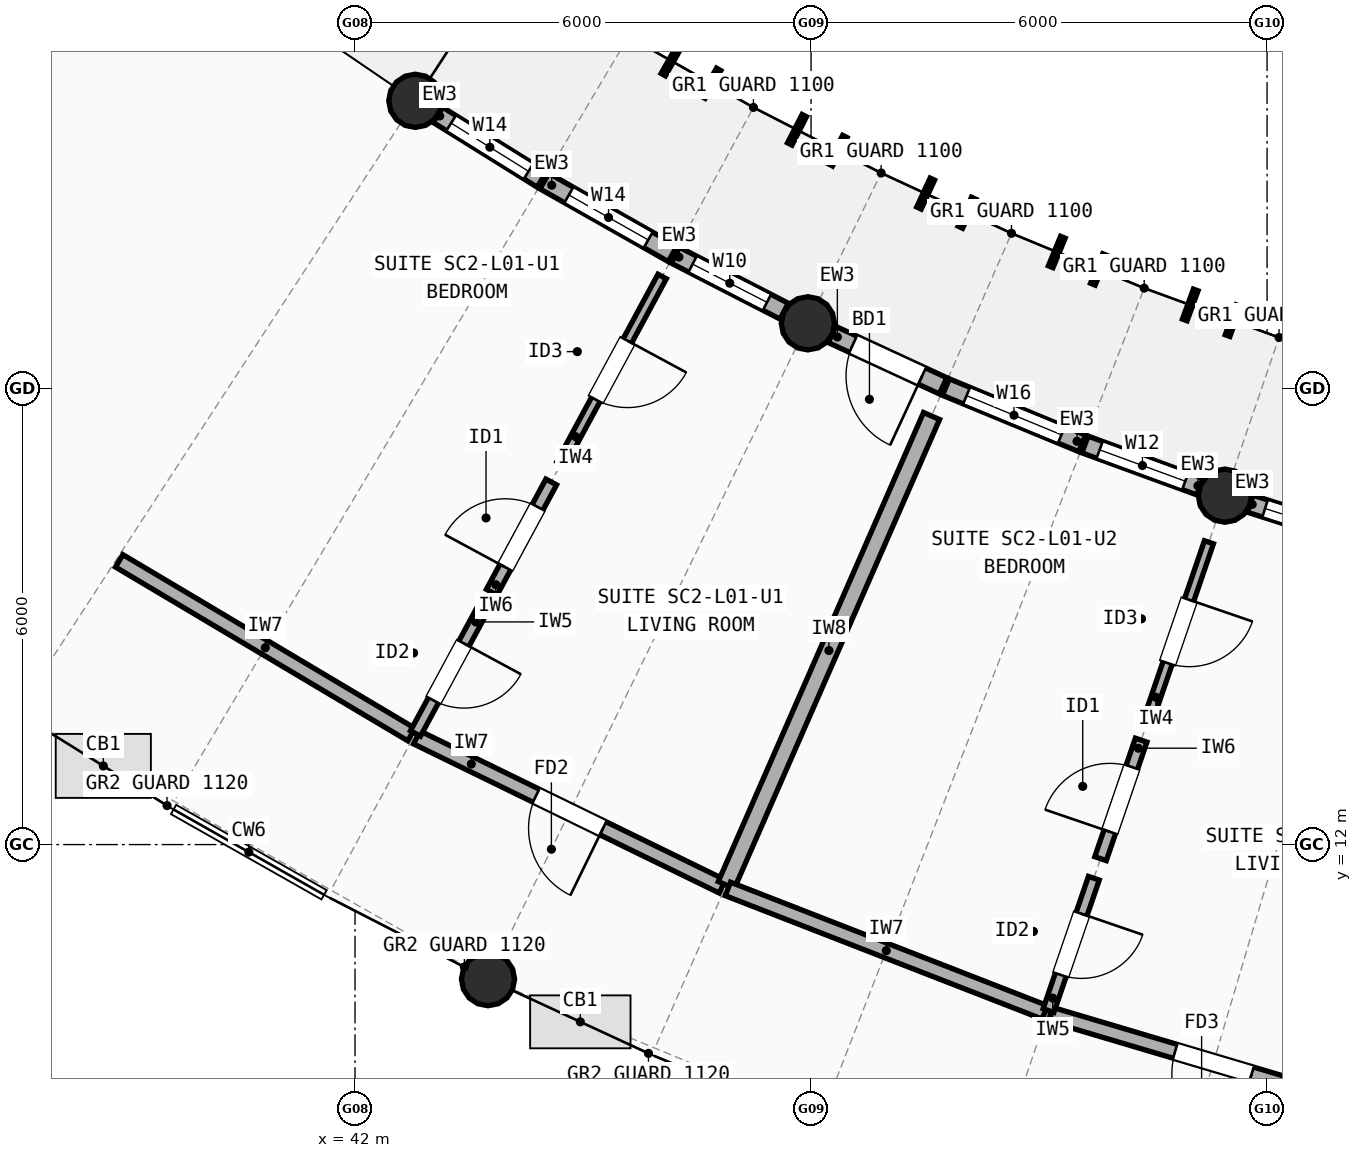
"""IFC4 building model, lengths in metres.
Left out: names, types, materials, properties, quantities, classifications, styles, units other than length and angle.
Written with IfcOpenShell. Run it as: python <this file> out.ifc"""

import sys

from ifc_helpers import new_model, si_unit, direction, frame, frame_2d, origin, origin_2d, place, context, subcontext, project, spatial, rectangle, circle, extrude, element, fill, save


model = new_model("IFC4")
c1 = context("Model", 3, precision=1e-05, world=origin(), true_north=direction((0.0, 1.0)))
c2 = subcontext(c1, "Body", "Model", "MODEL_VIEW")
j1 = project(units=[si_unit("LENGTHUNIT", "METRE"), si_unit("PLANEANGLEUNIT", "RADIAN")], contexts=[c1])
p1 = place(None, origin())
s1 = spatial("IfcSite", under=j1, at=p1, CompositionType="ELEMENT")
p2 = place(p1, origin())
s2 = spatial("IfcBuilding", under=s1, at=p2, CompositionType="ELEMENT")
p3 = place(p2, frame((0.0, 0.0, 4.5)))
s3 = spatial("IfcBuildingStorey", under=s2, at=p3, CompositionType="ELEMENT", Elevation=4.5)
for number, where, z_axis, x_axis in (
    (1, (42.793, 21.785, 0.0), (0.0, 0.0, 1.0), (1.0, 0.0, 0.0)),
    (2, (47.958, 18.858, 0.0), (0.0, 0.0, 1.0), (1.0, 0.0, 0.0)),
    (3, (43.75, 10.229, 0.0), (0.0, 0.0, 1.0), (1.0, 0.0, 0.0)),
    (4, (53.445, 16.59, 0.0), (0.0, 0.0, 1.0), (1.0, 0.0, 0.0)),
):
    element("IfcColumn", number, at=place(p3, frame(where, z_axis=z_axis, x_axis=x_axis)), inside=s3, PredefinedType="COLUMN", context=c2, shape_type="SweptSolid", body=[
        extrude(circle(Radius=0.35, at=origin_2d()), origin(), (0.0, 0.0, 1.0), 2.948),
    ])
p4 = place(p3, frame((43.091, 21.6, 0.0), z_axis=(0.0, 0.0, 1.0), x_axis=(0.848934138406, -0.528498655296, 0.0)))
e5 = element("IfcWall", 5, at=p4, inside=s3, PredefinedType="STANDARD", context=c2, shape_type="SweptSolid", body=[
    extrude(rectangle(XDim=1.61, YDim=0.235, at=frame_2d((0.805, 0.0))), origin(), (0.0, 0.0, 1.0), 2.684),
])
p5 = place(p4, frame((0.205, 0.0, 0.85)))
e6 = element("IfcOpeningElement", 6, at=p5, cuts=e5, PredefinedType="OPENING", context=c2, shape_type="SweptSolid", body=[
    extrude(rectangle(XDim=1.2, YDim=1.5, at=frame_2d((0.6, 0.75))), frame((0.0, 0.127, 0.0), z_axis=(0.0, -1.0, 0.0), x_axis=(1.0, 0.0, 0.0)), (0.0, 0.0, 1.0), 0.255),
])
p6 = place(p3, frame((44.492, 20.729, 0.0), z_axis=(0.0, 0.0, 1.0), x_axis=(0.86993400964, -0.493168144623, 0.0)))
e7 = element("IfcWall", 7, at=p6, inside=s3, PredefinedType="STANDARD", context=c2, shape_type="SweptSolid", body=[
    extrude(rectangle(XDim=1.94, YDim=0.235, at=frame_2d((0.97, 0.0))), origin(), (0.0, 0.0, 1.0), 2.684),
])
p7 = place(p6, frame((0.37, 0.0, 0.85)))
e8 = element("IfcOpeningElement", 8, at=p7, cuts=e7, PredefinedType="OPENING", context=c2, shape_type="SweptSolid", body=[
    extrude(rectangle(XDim=1.2, YDim=1.5, at=frame_2d((0.6, 0.75))), frame((0.0, 0.127, 0.0), z_axis=(0.0, -1.0, 0.0), x_axis=(1.0, 0.0, 0.0)), (0.0, 0.0, 1.0), 0.255),
])
p8 = place(p3, frame((46.215, 19.753, 0.0), z_axis=(0.0, 0.0, 1.0), x_axis=(0.889553696252, -0.456830626693, 0.0)))
e9 = element("IfcWall", 9, at=p8, inside=s3, PredefinedType="STANDARD", context=c2, shape_type="SweptSolid", body=[
    extrude(rectangle(XDim=1.61, YDim=0.235, at=frame_2d((0.805, 0.0))), origin(), (0.0, 0.0, 1.0), 2.684),
])
p9 = place(p8, frame((0.255, 0.0, 0.85)))
e10 = element("IfcOpeningElement", 10, at=p9, cuts=e9, PredefinedType="OPENING", context=c2, shape_type="SweptSolid", body=[
    extrude(rectangle(XDim=1.1, YDim=1.45, at=frame_2d((0.55, 0.725))), frame((0.0, 0.127, 0.0), z_axis=(0.0, -1.0, 0.0), x_axis=(1.0, 0.0, 0.0)), (0.0, 0.0, 1.0), 0.255),
])
p10 = place(p3, frame((48.276, 18.711, 0.0), z_axis=(0.0, 0.0, 1.0), x_axis=(0.907630651946, -0.419769698344, 0.0)))
e11 = element("IfcWall", 11, at=p10, inside=s3, PredefinedType="STANDARD", context=c2, shape_type="SweptSolid", body=[
    extrude(rectangle(XDim=1.61, YDim=0.235, at=frame_2d((0.805, 0.0))), origin(), (0.0, 0.0, 1.0), 2.684),
])
p11 = place(p10, frame((0.305, 0.0, 0.0)))
e12 = element("IfcOpeningElement", 12, at=p11, cuts=e11, PredefinedType="OPENING", context=c2, shape_type="SweptSolid", body=[
    extrude(rectangle(XDim=1.0, YDim=2.15, at=frame_2d((0.5, 1.075))), frame((0.0, 0.127, 0.0), z_axis=(0.0, -1.0, 0.0), x_axis=(1.0, 0.0, 0.0)), (0.0, 0.0, 1.0), 0.255),
])
p12 = place(p3, frame((49.774, 18.019, 0.0), z_axis=(0.0, 0.0, 1.0), x_axis=(0.92414555515, -0.382040564465, 0.0)))
e13 = element("IfcWall", 13, at=p12, inside=s3, PredefinedType="STANDARD", context=c2, shape_type="SweptSolid", body=[
    extrude(rectangle(XDim=1.94, YDim=0.235, at=frame_2d((0.97, 0.0))), origin(), (0.0, 0.0, 1.0), 2.684),
])
p13 = place(p12, frame((0.295, 0.0, 0.85)))
e14 = element("IfcOpeningElement", 14, at=p13, cuts=e13, PredefinedType="OPENING", context=c2, shape_type="SweptSolid", body=[
    extrude(rectangle(XDim=1.35, YDim=1.5, at=frame_2d((0.675, 0.75))), frame((0.0, 0.127, 0.0), z_axis=(0.0, -1.0, 0.0), x_axis=(1.0, 0.0, 0.0)), (0.0, 0.0, 1.0), 0.255),
])
p14 = place(p3, frame((51.604, 17.264, 0.0), z_axis=(0.0, 0.0, 1.0), x_axis=(0.939176538502, -0.34343475294, 0.0)))
e15 = element("IfcWall", 15, at=p14, inside=s3, PredefinedType="STANDARD", context=c2, shape_type="SweptSolid", body=[
    extrude(rectangle(XDim=1.61, YDim=0.235, at=frame_2d((0.805, 0.0))), origin(), (0.0, 0.0, 1.0), 2.684),
])
p15 = place(p14, frame((0.205, 0.0, 0.85)))
e16 = element("IfcOpeningElement", 16, at=p15, cuts=e15, PredefinedType="OPENING", context=c2, shape_type="SweptSolid", body=[
    extrude(rectangle(XDim=1.2, YDim=1.35, at=frame_2d((0.6, 0.675))), frame((0.0, 0.127, 0.0), z_axis=(0.0, -1.0, 0.0), x_axis=(1.0, 0.0, 0.0)), (0.0, 0.0, 1.0), 0.255),
])
p16 = place(p3, frame((53.778, 16.484, 0.0), z_axis=(0.0, 0.0, 1.0), x_axis=(0.952508629145, -0.304511594861, 0.0)))
e17 = element("IfcWall", 17, at=p16, inside=s3, PredefinedType="STANDARD", context=c2, shape_type="SweptSolid", body=[
    extrude(rectangle(XDim=1.61, YDim=0.235, at=frame_2d((0.805, 0.0))), origin(), (0.0, 0.0, 1.0), 2.684),
])
p17 = place(p16, frame((0.205, 0.0, 0.85)))
e18 = element("IfcOpeningElement", 18, at=p17, cuts=e17, PredefinedType="OPENING", context=c2, shape_type="SweptSolid", body=[
    extrude(rectangle(XDim=1.2, YDim=1.45, at=frame_2d((0.6, 0.725))), frame((0.0, 0.127, 0.0), z_axis=(0.0, -1.0, 0.0), x_axis=(1.0, 0.0, 0.0)), (0.0, 0.0, 1.0), 0.255),
])
p18 = place(p3, frame((38.897, 15.733, 0.0), z_axis=(0.0, 0.0, 1.0), x_axis=(0.859614290038, -0.510943511909, 0.0)))
e19 = element("IfcWall", 19, at=p18, inside=s3, PredefinedType="SOLIDWALL", context=c2, shape_type="SweptSolid", body=[
    extrude(rectangle(XDim=4.473, YDim=0.19, at=frame_2d((2.236, 0.0))), origin(), (0.0, 0.0, 1.0), 2.742),
])
p19 = place(p3, frame((42.812, 13.409, 0.0), z_axis=(0.0, 0.0, 1.0), x_axis=(0.898794149603, -0.438370934985, 0.0)))
e20 = element("IfcWall", 20, at=p19, inside=s3, PredefinedType="SOLIDWALL", context=c2, shape_type="SweptSolid", body=[
    extrude(rectangle(XDim=4.473, YDim=0.19, at=frame_2d((2.236, 0.0))), origin(), (0.0, 0.0, 1.0), 2.722),
])
p20 = place(p19, frame((1.747, 0.0, 0.0)))
e21 = element("IfcOpeningElement", 21, at=p20, cuts=e20, PredefinedType="OPENING", context=c2, shape_type="SweptSolid", body=[
    extrude(rectangle(XDim=0.98, YDim=2.15, at=frame_2d((0.49, 1.075))), frame((0.0, 0.105, 0.0), z_axis=(0.0, -1.0, 0.0), x_axis=(1.0, 0.0, 0.0)), (0.0, 0.0, 1.0), 0.21),
])
p21 = place(p3, frame((46.041, 19.474, 0.0), z_axis=(0.0, 0.0, 1.0), x_axis=(-0.475103009949, -0.879930184695, 0.0)))
e22 = element("IfcWall", 22, at=p21, inside=s3, PredefinedType="PARTITIONING", context=c2, shape_type="SweptSolid", body=[
    extrude(rectangle(XDim=2.8, YDim=0.125, at=frame_2d((1.4, 0.0))), origin(), (0.0, 0.0, 1.0), 2.762),
])
p22 = place(p21, frame((0.96, 0.0, 0.0)))
e23 = element("IfcOpeningElement", 23, at=p22, cuts=e22, PredefinedType="OPENING", context=c2, shape_type="SweptSolid", body=[
    extrude(rectangle(XDim=0.88, YDim=2.1, at=frame_2d((0.44, 1.05))), frame((0.0, 0.073, 0.0), z_axis=(0.0, -1.0, 0.0), x_axis=(1.0, 0.0, 0.0)), (0.0, 0.0, 1.0), 0.145),
])
p23 = place(p3, frame((44.582, 16.771, 0.0), z_axis=(0.0, 0.0, 1.0), x_axis=(-0.475080097018, -0.879942555749, 0.0)))
e24 = element("IfcWall", 24, at=p23, inside=s3, PredefinedType="PLUMBINGWALL", context=c2, shape_type="SweptSolid", body=[
    extrude(rectangle(XDim=1.648, YDim=0.16, at=frame_2d((0.824, 0.0))), origin(), (0.0, 0.0, 1.0), 2.762),
])
p24 = place(p23, frame((0.374, 0.0, 0.0)))
e25 = element("IfcOpeningElement", 25, at=p24, cuts=e24, PredefinedType="OPENING", context=c2, shape_type="SweptSolid", body=[
    extrude(rectangle(XDim=0.9, YDim=2.1, at=frame_2d((0.45, 1.05))), frame((0.0, 0.09, 0.0), z_axis=(0.0, -1.0, 0.0), x_axis=(1.0, 0.0, 0.0)), (0.0, 0.0, 1.0), 0.18),
])
p25 = place(p3, frame((43.669, 15.081, 0.0), z_axis=(0.0, 0.0, 1.0), x_axis=(-0.475017414672, -0.879976395001, 0.0)))
e26 = element("IfcWall", 26, at=p25, inside=s3, PredefinedType="PARTITIONING", context=c2, shape_type="SweptSolid", body=[
    extrude(rectangle(XDim=1.84, YDim=0.15, at=frame_2d((0.92, 0.0))), origin(), (0.0, 0.0, 1.0), 2.762),
])
p26 = place(p25, frame((0.495, 0.0, 0.0)))
e27 = element("IfcOpeningElement", 27, at=p26, cuts=e26, PredefinedType="OPENING", context=c2, shape_type="SweptSolid", body=[
    extrude(rectangle(XDim=0.85, YDim=2.1, at=frame_2d((0.425, 1.05))), frame((0.0, 0.085, 0.0), z_axis=(0.0, -1.0, 0.0), x_axis=(1.0, 0.0, 0.0)), (0.0, 0.0, 1.0), 0.17),
])
p27 = place(p3, frame((49.585, 17.638, 0.0), z_axis=(0.0, 0.0, 1.0), x_axis=(-0.400932910895, -0.916107417807, 0.0)))
e28 = element("IfcWall", 28, at=p27, inside=s3, PredefinedType="SOLIDWALL", context=c2, shape_type="SweptSolid", body=[
    extrude(rectangle(XDim=6.736, YDim=0.23, at=frame_2d((3.368, 0.0))), origin(), (0.0, 0.0, 1.0), 2.742),
])
p28 = place(p3, frame((46.906, 11.417, 0.0), z_axis=(0.0, 0.0, 1.0), x_axis=(0.931847867525, -0.362849213571, 0.0)))
e29 = element("IfcWall", 29, at=p28, inside=s3, PredefinedType="SOLIDWALL", context=c2, shape_type="SweptSolid", body=[
    extrude(rectangle(XDim=4.473, YDim=0.19, at=frame_2d((2.237, 0.0))), origin(), (0.0, 0.0, 1.0), 2.762),
])
p29 = place(p3, frame((51.15, 9.768, 0.0), z_axis=(0.0, 0.0, 1.0), x_axis=(0.958602413557, -0.28474798107, 0.0)))
e30 = element("IfcWall", 30, at=p29, inside=s3, PredefinedType="SOLIDWALL", context=c2, shape_type="SweptSolid", body=[
    extrude(rectangle(XDim=4.473, YDim=0.19, at=frame_2d((2.236, 0.0))), origin(), (0.0, 0.0, 1.0), 2.742),
])
p30 = place(p29, frame((1.711, 0.0, 0.0)))
e31 = element("IfcOpeningElement", 31, at=p30, cuts=e30, PredefinedType="OPENING", context=c2, shape_type="SweptSolid", body=[
    extrude(rectangle(XDim=1.05, YDim=2.15, at=frame_2d((0.525, 1.075))), frame((0.0, 0.105, 0.0), z_axis=(0.0, -1.0, 0.0), x_axis=(1.0, 0.0, 0.0)), (0.0, 0.0, 1.0), 0.21),
])
p31 = place(p3, frame((53.235, 15.977, 0.0), z_axis=(0.0, 0.0, 1.0), x_axis=(-0.324072633759, -0.946032202437, 0.0)))
e32 = element("IfcWall", 32, at=p31, inside=s3, PredefinedType="PARTITIONING", context=c2, shape_type="SweptSolid", body=[
    extrude(rectangle(XDim=2.48, YDim=0.125, at=frame_2d((1.24, 0.0))), origin(), (0.0, 0.0, 1.0), 2.722),
])
p32 = place(p31, frame((0.8, 0.0, 0.0)))
e33 = element("IfcOpeningElement", 33, at=p32, cuts=e32, PredefinedType="OPENING", context=c2, shape_type="SweptSolid", body=[
    extrude(rectangle(XDim=0.88, YDim=2.1, at=frame_2d((0.44, 1.05))), frame((0.0, 0.073, 0.0), z_axis=(0.0, -1.0, 0.0), x_axis=(1.0, 0.0, 0.0)), (0.0, 0.0, 1.0), 0.145),
])
p33 = place(p3, frame((52.343, 13.374, 0.0), z_axis=(0.0, 0.0, 1.0), x_axis=(-0.324127376206, -0.946013448104, 0.0)))
e34 = element("IfcWall", 34, at=p33, inside=s3, PredefinedType="PLUMBINGWALL", context=c2, shape_type="SweptSolid", body=[
    extrude(rectangle(XDim=1.648, YDim=0.16, at=frame_2d((0.824, 0.0))), origin(), (0.0, 0.0, 1.0), 2.722),
])
p34 = place(p33, frame((0.374, 0.0, 0.0)))
e35 = element("IfcOpeningElement", 35, at=p34, cuts=e34, PredefinedType="OPENING", context=c2, shape_type="SweptSolid", body=[
    extrude(rectangle(XDim=0.9, YDim=2.1, at=frame_2d((0.45, 1.05))), frame((0.0, 0.09, 0.0), z_axis=(0.0, -1.0, 0.0), x_axis=(1.0, 0.0, 0.0)), (0.0, 0.0, 1.0), 0.18),
])
p35 = place(p3, frame((51.721, 11.558, 0.0), z_axis=(0.0, 0.0, 1.0), x_axis=(-0.323978335312, -0.946064500046, 0.0)))
e36 = element("IfcWall", 36, at=p35, inside=s3, PredefinedType="PARTITIONING", context=c2, shape_type="SweptSolid", body=[
    extrude(rectangle(XDim=1.84, YDim=0.15, at=frame_2d((0.92, 0.0))), origin(), (0.0, 0.0, 1.0), 2.722),
])
p36 = place(p35, frame((0.495, 0.0, 0.0)))
e37 = element("IfcOpeningElement", 37, at=p36, cuts=e36, PredefinedType="OPENING", context=c2, shape_type="SweptSolid", body=[
    extrude(rectangle(XDim=0.85, YDim=2.1, at=frame_2d((0.425, 1.05))), frame((0.0, 0.085, 0.0), z_axis=(0.0, -1.0, 0.0), x_axis=(1.0, 0.0, 0.0)), (0.0, 0.0, 1.0), 0.17),
])
p37 = place(p5, origin())
e38 = element("IfcWindow", 38, at=p37, inside=s3, PartitioningType="SINGLE_PANEL", PredefinedType="WINDOW", context=c2, shape_type="SweptSolid", body=[
    extrude(rectangle(XDim=1.2, YDim=1.5, at=frame_2d((0.6, 0.75))), frame((0.0, 0.03, 0.0), z_axis=(0.0, -1.0, 0.0), x_axis=(1.0, 0.0, 0.0)), (0.0, 0.0, 1.0), 0.06),
])
fill(e6, e38)
p38 = place(p7, origin())
e39 = element("IfcWindow", 39, at=p38, inside=s3, PartitioningType="SINGLE_PANEL", PredefinedType="WINDOW", context=c2, shape_type="SweptSolid", body=[
    extrude(rectangle(XDim=1.2, YDim=1.5, at=frame_2d((0.6, 0.75))), frame((0.0, 0.03, 0.0), z_axis=(0.0, -1.0, 0.0), x_axis=(1.0, 0.0, 0.0)), (0.0, 0.0, 1.0), 0.06),
])
fill(e8, e39)
p39 = place(p9, origin())
e40 = element("IfcWindow", 40, at=p39, inside=s3, PartitioningType="SINGLE_PANEL", PredefinedType="WINDOW", context=c2, shape_type="SweptSolid", body=[
    extrude(rectangle(XDim=1.1, YDim=1.45, at=frame_2d((0.55, 0.725))), frame((0.0, 0.03, 0.0), z_axis=(0.0, -1.0, 0.0), x_axis=(1.0, 0.0, 0.0)), (0.0, 0.0, 1.0), 0.06),
])
fill(e10, e40)
p40 = place(p11, origin())
e41 = element("IfcDoor", 41, at=p40, inside=s3, OperationType="SINGLE_SWING_RIGHT", PredefinedType="DOOR", context=c2, shape_type="SweptSolid", body=[
    extrude(rectangle(XDim=1.0, YDim=2.15, at=frame_2d((0.5, 1.075))), frame((0.0, 0.025, 0.0), z_axis=(0.0, -1.0, 0.0), x_axis=(1.0, 0.0, 0.0)), (0.0, 0.0, 1.0), 0.05),
])
fill(e12, e41)
p41 = place(p13, origin())
e42 = element("IfcWindow", 42, at=p41, inside=s3, PartitioningType="SINGLE_PANEL", PredefinedType="WINDOW", context=c2, shape_type="SweptSolid", body=[
    extrude(rectangle(XDim=1.35, YDim=1.5, at=frame_2d((0.675, 0.75))), frame((0.0, 0.03, 0.0), z_axis=(0.0, -1.0, 0.0), x_axis=(1.0, 0.0, 0.0)), (0.0, 0.0, 1.0), 0.06),
])
fill(e14, e42)
p42 = place(p15, origin())
e43 = element("IfcWindow", 43, at=p42, inside=s3, PartitioningType="SINGLE_PANEL", PredefinedType="WINDOW", context=c2, shape_type="SweptSolid", body=[
    extrude(rectangle(XDim=1.2, YDim=1.35, at=frame_2d((0.6, 0.675))), frame((0.0, 0.03, 0.0), z_axis=(0.0, -1.0, 0.0), x_axis=(1.0, 0.0, 0.0)), (0.0, 0.0, 1.0), 0.06),
])
fill(e16, e43)
p43 = place(p17, origin())
e44 = element("IfcWindow", 44, at=p43, inside=s3, PartitioningType="SINGLE_PANEL", PredefinedType="WINDOW", context=c2, shape_type="SweptSolid", body=[
    extrude(rectangle(XDim=1.2, YDim=1.45, at=frame_2d((0.6, 0.725))), frame((0.0, 0.03, 0.0), z_axis=(0.0, -1.0, 0.0), x_axis=(1.0, 0.0, 0.0)), (0.0, 0.0, 1.0), 0.06),
])
fill(e18, e44)
p44 = place(p20, origin())
e45 = element("IfcDoor", 45, at=p44, inside=s3, OperationType="SINGLE_SWING_RIGHT", PredefinedType="DOOR", context=c2, shape_type="SweptSolid", body=[
    extrude(rectangle(XDim=0.98, YDim=2.15, at=frame_2d((0.49, 1.075))), frame((0.0, 0.025, 0.0), z_axis=(0.0, -1.0, 0.0), x_axis=(1.0, 0.0, 0.0)), (0.0, 0.0, 1.0), 0.05),
])
fill(e21, e45)
p45 = place(p22, origin())
e46 = element("IfcDoor", 46, at=p45, inside=s3, OperationType="SINGLE_SWING_LEFT", PredefinedType="DOOR", context=c2, shape_type="SweptSolid", body=[
    extrude(rectangle(XDim=0.88, YDim=2.1, at=frame_2d((0.44, 1.05))), frame((0.0, 0.025, 0.0), z_axis=(0.0, -1.0, 0.0), x_axis=(1.0, 0.0, 0.0)), (0.0, 0.0, 1.0), 0.05),
])
fill(e23, e46)
p46 = place(p24, origin())
e47 = element("IfcDoor", 47, at=p46, inside=s3, OperationType="SINGLE_SWING_RIGHT", PredefinedType="DOOR", context=c2, shape_type="SweptSolid", body=[
    extrude(rectangle(XDim=0.9, YDim=2.1, at=frame_2d((0.45, 1.05))), frame((0.0, 0.025, 0.0), z_axis=(0.0, -1.0, 0.0), x_axis=(1.0, 0.0, 0.0)), (0.0, 0.0, 1.0), 0.05),
])
fill(e25, e47)
p47 = place(p26, origin())
e48 = element("IfcDoor", 48, at=p47, inside=s3, OperationType="SINGLE_SWING_LEFT", PredefinedType="DOOR", context=c2, shape_type="SweptSolid", body=[
    extrude(rectangle(XDim=0.85, YDim=2.1, at=frame_2d((0.425, 1.05))), frame((0.0, 0.025, 0.0), z_axis=(0.0, -1.0, 0.0), x_axis=(1.0, 0.0, 0.0)), (0.0, 0.0, 1.0), 0.05),
])
fill(e27, e48)
p48 = place(p30, origin())
e49 = element("IfcDoor", 49, at=p48, inside=s3, OperationType="SINGLE_SWING_RIGHT", PredefinedType="DOOR", context=c2, shape_type="SweptSolid", body=[
    extrude(rectangle(XDim=1.05, YDim=2.15, at=frame_2d((0.525, 1.075))), frame((0.0, 0.025, 0.0), z_axis=(0.0, -1.0, 0.0), x_axis=(1.0, 0.0, 0.0)), (0.0, 0.0, 1.0), 0.05),
])
fill(e31, e49)
p49 = place(p32, origin())
e50 = element("IfcDoor", 50, at=p49, inside=s3, OperationType="SINGLE_SWING_LEFT", PredefinedType="DOOR", context=c2, shape_type="SweptSolid", body=[
    extrude(rectangle(XDim=0.88, YDim=2.1, at=frame_2d((0.44, 1.05))), frame((0.0, 0.025, 0.0), z_axis=(0.0, -1.0, 0.0), x_axis=(1.0, 0.0, 0.0)), (0.0, 0.0, 1.0), 0.05),
])
fill(e33, e50)
p50 = place(p34, origin())
e51 = element("IfcDoor", 51, at=p50, inside=s3, OperationType="SINGLE_SWING_RIGHT", PredefinedType="DOOR", context=c2, shape_type="SweptSolid", body=[
    extrude(rectangle(XDim=0.9, YDim=2.1, at=frame_2d((0.45, 1.05))), frame((0.0, 0.025, 0.0), z_axis=(0.0, -1.0, 0.0), x_axis=(1.0, 0.0, 0.0)), (0.0, 0.0, 1.0), 0.05),
])
fill(e35, e51)
p51 = place(p36, origin())
e52 = element("IfcDoor", 52, at=p51, inside=s3, OperationType="SINGLE_SWING_LEFT", PredefinedType="DOOR", context=c2, shape_type="SweptSolid", body=[
    extrude(rectangle(XDim=0.85, YDim=2.1, at=frame_2d((0.425, 1.05))), frame((0.0, 0.025, 0.0), z_axis=(0.0, -1.0, 0.0), x_axis=(1.0, 0.0, 0.0)), (0.0, 0.0, 1.0), 0.05),
])
fill(e37, e52)
save(model, sys.argv[1])
